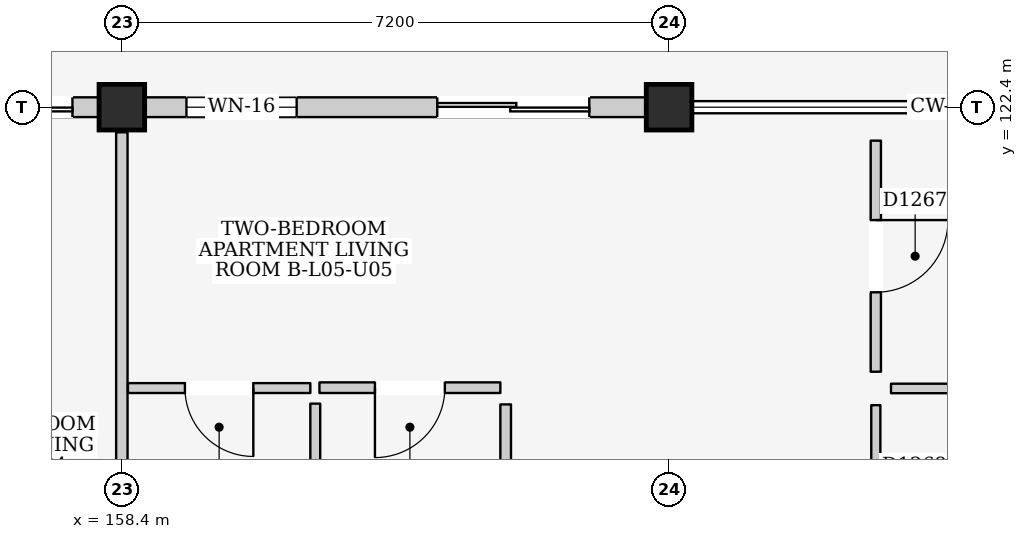
"""IFC4 building model, lengths in metres.
Left out: names, types, materials, properties, quantities, classifications, styles, units other than length and angle.
Written with IfcOpenShell. Run it as: python <this file> out.ifc"""

import sys

from ifc_helpers import new_model, si_unit, direction, frame, frame_2d, origin, origin_2d, place, context, subcontext, project, spatial, rectangle, extrude, element, fill, save


model = new_model("IFC4")
c1 = context("Model", 3, precision=1e-05, world=origin(), true_north=direction((0.0, 1.0)))
c2 = subcontext(c1, "Body", "Model", "MODEL_VIEW")
j1 = project(units=[si_unit("LENGTHUNIT", "METRE"), si_unit("PLANEANGLEUNIT", "RADIAN")], contexts=[c1])
p1 = place(None, origin())
s1 = spatial("IfcSite", under=j1, at=p1, CompositionType="ELEMENT")
p2 = place(p1, origin())
s2 = spatial("IfcBuilding", under=s1, at=p2, CompositionType="ELEMENT")
p3 = place(p2, frame((0.0, 0.0, 18.6)))
s3 = spatial("IfcBuildingStorey", under=s2, at=p3, CompositionType="ELEMENT", Elevation=18.6)
for number, where, z_axis, x_axis in (
    (1, (158.4, 122.4, 0.0), (0.0, 0.0, 1.0), (1.0, 0.0, 0.0)),
    (2, (165.6, 122.4, 0.0), (0.0, 0.0, 1.0), (1.0, 0.0, 0.0)),
):
    element("IfcColumn", number, at=place(p3, frame(where, z_axis=z_axis, x_axis=x_axis)), inside=s3, PredefinedType="COLUMN", context=c2, shape_type="SweptSolid", body=[
        extrude(rectangle(XDim=0.6, YDim=0.6, at=origin_2d()), origin(), (0.0, 0.0, 1.0), 3.3),
    ])
p4 = place(p3, frame((151.5, 122.4, 0.0), z_axis=(0.0, 0.0, 1.0), x_axis=(1.0, 0.0, 0.0)))
e3 = element("IfcWall", 3, at=p4, inside=s3, PredefinedType="ELEMENTEDWALL", context=c2, shape_type="SweptSolid", body=[
    extrude(rectangle(XDim=6.6, YDim=0.26, at=frame_2d((3.3, 0.0))), origin(), (0.0, 0.0, 1.0), 2.595),
])
p5 = place(p4, frame((3.85, 0.0, 0.0)))
e4 = element("IfcOpeningElement", 4, at=p5, cuts=e3, PredefinedType="OPENING", context=c2, shape_type="SweptSolid", body=[
    extrude(rectangle(XDim=2.4, YDim=2.12, at=frame_2d((1.2, 1.06))), frame((0.0, 0.145, 0.0), z_axis=(0.0, -1.0, 0.0), x_axis=(1.0, 0.0, 0.0)), (0.0, 0.0, 1.0), 0.29),
])
p6 = place(p4, frame((0.55, 0.0, 0.9)))
e5 = element("IfcOpeningElement", 5, at=p6, cuts=e3, PredefinedType="OPENING", context=c2, shape_type="SweptSolid", body=[
    extrude(rectangle(XDim=1.7, YDim=1.45, at=frame_2d((0.85, 0.725))), frame((0.0, 0.145, 0.0), z_axis=(0.0, -1.0, 0.0), x_axis=(1.0, 0.0, 0.0)), (0.0, 0.0, 1.0), 0.29),
])
p7 = place(p3, frame((158.7, 122.4, 0.0), z_axis=(0.0, 0.0, 1.0), x_axis=(1.0, 0.0, 0.0)))
e6 = element("IfcWall", 6, at=p7, inside=s3, PredefinedType="ELEMENTEDWALL", context=c2, shape_type="SweptSolid", body=[
    extrude(rectangle(XDim=6.6, YDim=0.26, at=frame_2d((3.3, 0.0))), origin(), (0.0, 0.0, 1.0), 2.595),
])
p8 = place(p7, frame((3.85, 0.0, 0.0)))
e7 = element("IfcOpeningElement", 7, at=p8, cuts=e6, PredefinedType="OPENING", context=c2, shape_type="SweptSolid", body=[
    extrude(rectangle(XDim=2.0, YDim=2.12, at=frame_2d((1.0, 1.06))), frame((0.0, 0.145, 0.0), z_axis=(0.0, -1.0, 0.0), x_axis=(1.0, 0.0, 0.0)), (0.0, 0.0, 1.0), 0.29),
])
p9 = place(p7, frame((0.55, 0.0, 0.9)))
e8 = element("IfcOpeningElement", 8, at=p9, cuts=e6, PredefinedType="OPENING", context=c2, shape_type="SweptSolid", body=[
    extrude(rectangle(XDim=1.45, YDim=1.4, at=frame_2d((0.725, 0.7))), frame((0.0, 0.145, 0.0), z_axis=(0.0, -1.0, 0.0), x_axis=(1.0, 0.0, 0.0)), (0.0, 0.0, 1.0), 0.29),
])
p10 = place(p3, frame((158.4, 115.53, 0.0), z_axis=(0.0, 0.0, 1.0), x_axis=(0.0, 1.0, 0.0)))
e9 = element("IfcWall", 9, at=p10, inside=s3, PredefinedType="PARTITIONING", context=c2, shape_type="SweptSolid", body=[
    extrude(rectangle(XDim=6.54, YDim=0.15, at=frame_2d((3.27, 0.0))), origin(), (0.0, 0.0, 1.0), 2.545),
])
p11 = place(p3, frame((158.48, 118.705, 0.0), z_axis=(0.0, 0.0, 1.0), x_axis=(1.0, 0.0, 0.0)))
e10 = element("IfcWall", 10, at=p11, inside=s3, PredefinedType="PARTITIONING", context=c2, shape_type="SweptSolid", body=[
    extrude(rectangle(XDim=2.4, YDim=0.13, at=frame_2d((1.2, 0.0))), origin(), (0.0, 0.0, 1.0), 3.06),
])
p12 = place(p11, frame((0.75, 0.0, 0.0)))
e11 = element("IfcOpeningElement", 11, at=p12, cuts=e10, PredefinedType="OPENING", context=c2, shape_type="SweptSolid", body=[
    extrude(rectangle(XDim=0.9, YDim=2.1, at=frame_2d((0.45, 1.05))), frame((0.0, 0.08, 0.0), z_axis=(0.0, -1.0, 0.0), x_axis=(1.0, 0.0, 0.0)), (0.0, 0.0, 1.0), 0.16),
])
p13 = place(p3, frame((160.945, 115.46, 0.0), z_axis=(0.0, 0.0, 1.0), x_axis=(0.0, 1.0, 0.0)))
e12 = element("IfcWall", 12, at=p13, inside=s3, PredefinedType="PARTITIONING", context=c2, shape_type="SweptSolid", body=[
    extrude(rectangle(XDim=3.04, YDim=0.13, at=frame_2d((1.52, 0.0))), origin(), (0.0, 0.0, 1.0), 3.06),
])
p14 = place(p3, frame((161.0, 118.71, 0.0), z_axis=(0.0, 0.0, 1.0), x_axis=(1.0, 0.0, 0.0)))
e13 = element("IfcWall", 13, at=p14, inside=s3, PredefinedType="PARTITIONING", context=c2, shape_type="SweptSolid", body=[
    extrude(rectangle(XDim=2.38, YDim=0.14, at=frame_2d((1.19, 0.0))), origin(), (0.0, 0.0, 1.0), 3.06),
])
p15 = place(p14, frame((0.73, 0.0, 0.0)))
e14 = element("IfcOpeningElement", 14, at=p15, cuts=e13, PredefinedType="OPENING", context=c2, shape_type="SweptSolid", body=[
    extrude(rectangle(XDim=0.92, YDim=2.1, at=frame_2d((0.46, 1.05))), frame((0.0, 0.085, 0.0), z_axis=(0.0, -1.0, 0.0), x_axis=(1.0, 0.0, 0.0)), (0.0, 0.0, 1.0), 0.17),
])
p16 = place(p3, frame((163.45, 115.43, 0.0), z_axis=(0.0, 0.0, 1.0), x_axis=(0.0, 1.0, 0.0)))
e15 = element("IfcWall", 15, at=p16, inside=s3, PredefinedType="PARTITIONING", context=c2, shape_type="SweptSolid", body=[
    extrude(rectangle(XDim=3.06, YDim=0.14, at=frame_2d((1.53, 0.0))), origin(), (0.0, 0.0, 1.0), 3.06),
])
p17 = place(p3, frame((168.32, 118.92, 0.0), z_axis=(0.0, 0.0, 1.0), x_axis=(0.0, 1.0, 0.0)))
e16 = element("IfcWall", 16, at=p17, inside=s3, PredefinedType="PARTITIONING", context=c2, shape_type="SweptSolid", body=[
    extrude(rectangle(XDim=3.04, YDim=0.135, at=frame_2d((1.52, 0.0))), origin(), (0.0, 0.0, 1.0), 3.06),
])
p18 = place(p17, frame((1.045, 0.0, 0.0)))
e17 = element("IfcOpeningElement", 17, at=p18, cuts=e16, PredefinedType="OPENING", context=c2, shape_type="SweptSolid", body=[
    extrude(rectangle(XDim=0.95, YDim=2.15, at=frame_2d((0.475, 1.075))), frame((0.0, 0.083, 0.0), z_axis=(0.0, -1.0, 0.0), x_axis=(1.0, 0.0, 0.0)), (0.0, 0.0, 1.0), 0.165),
])
p19 = place(p3, frame((168.52, 118.7, 0.0), z_axis=(0.0, 0.0, 1.0), x_axis=(1.0, 0.0, 0.0)))
e18 = element("IfcWall", 18, at=p19, inside=s3, PredefinedType="PARTITIONING", context=c2, shape_type="SweptSolid", body=[
    extrude(rectangle(XDim=4.06, YDim=0.125, at=frame_2d((2.03, 0.0))), origin(), (0.0, 0.0, 1.0), 3.06),
])
p20 = place(p3, frame((168.32, 115.44, 0.0), z_axis=(0.0, 0.0, 1.0), x_axis=(0.0, 1.0, 0.0)))
e19 = element("IfcWall", 19, at=p20, inside=s3, PredefinedType="PARTITIONING", context=c2, shape_type="SweptSolid", body=[
    extrude(rectangle(XDim=3.04, YDim=0.12, at=frame_2d((1.52, 0.0))), origin(), (0.0, 0.0, 1.0), 3.06),
])
p21 = place(p20, frame((1.04, 0.0, 0.0)))
e20 = element("IfcOpeningElement", 20, at=p21, cuts=e19, PredefinedType="OPENING", context=c2, shape_type="SweptSolid", body=[
    extrude(rectangle(XDim=0.96, YDim=2.15, at=frame_2d((0.48, 1.075))), frame((0.0, 0.075, 0.0), z_axis=(0.0, -1.0, 0.0), x_axis=(1.0, 0.0, 0.0)), (0.0, 0.0, 1.0), 0.15),
])
p22 = place(p5, frame((2.4, 0.0, 0.0), z_axis=(0.0, 0.0, 1.0), x_axis=(-1.0, 0.0, 0.0)))
e21 = element("IfcDoor", 21, at=p22, inside=s3, OperationType="DOUBLE_DOOR_SLIDING", PredefinedType="DOOR", context=c2, shape_type="SweptSolid", body=[
    extrude(rectangle(XDim=2.4, YDim=2.12, at=frame_2d((1.2, 1.06))), frame((0.0, 0.025, 0.0), z_axis=(0.0, -1.0, 0.0), x_axis=(1.0, 0.0, 0.0)), (0.0, 0.0, 1.0), 0.05),
])
fill(e4, e21)
p23 = place(p8, frame((2.0, 0.0, 0.0), z_axis=(0.0, 0.0, 1.0), x_axis=(-1.0, 0.0, 0.0)))
e22 = element("IfcDoor", 22, at=p23, inside=s3, OperationType="DOUBLE_DOOR_SLIDING", PredefinedType="DOOR", context=c2, shape_type="SweptSolid", body=[
    extrude(rectangle(XDim=2.0, YDim=2.12, at=frame_2d((1.0, 1.06))), frame((0.0, 0.025, 0.0), z_axis=(0.0, -1.0, 0.0), x_axis=(1.0, 0.0, 0.0)), (0.0, 0.0, 1.0), 0.05),
])
fill(e7, e22)
p24 = place(p9, origin())
e23 = element("IfcWindow", 23, at=p24, inside=s3, PartitioningType="DOUBLE_PANEL_VERTICAL", PredefinedType="WINDOW", context=c2, shape_type="SweptSolid", body=[
    extrude(rectangle(XDim=1.45, YDim=1.4, at=frame_2d((0.725, 0.7))), frame((0.0, 0.03, 0.0), z_axis=(0.0, -1.0, 0.0), x_axis=(1.0, 0.0, 0.0)), (0.0, 0.0, 1.0), 0.06),
])
fill(e8, e23)
p25 = place(p12, frame((0.9, 0.0, 0.0), z_axis=(0.0, 0.0, 1.0), x_axis=(-1.0, 0.0, 0.0)))
e24 = element("IfcDoor", 24, at=p25, inside=s3, OperationType="SINGLE_SWING_LEFT", PredefinedType="DOOR", context=c2, shape_type="SweptSolid", body=[
    extrude(rectangle(XDim=0.9, YDim=2.1, at=frame_2d((0.45, 1.05))), frame((0.0, 0.025, 0.0), z_axis=(0.0, -1.0, 0.0), x_axis=(1.0, 0.0, 0.0)), (0.0, 0.0, 1.0), 0.05),
])
fill(e11, e24)
p26 = place(p15, frame((0.92, 0.0, 0.0), z_axis=(0.0, 0.0, 1.0), x_axis=(-1.0, 0.0, 0.0)))
e25 = element("IfcDoor", 25, at=p26, inside=s3, OperationType="SINGLE_SWING_RIGHT", PredefinedType="DOOR", context=c2, shape_type="SweptSolid", body=[
    extrude(rectangle(XDim=0.92, YDim=2.1, at=frame_2d((0.46, 1.05))), frame((0.0, 0.025, 0.0), z_axis=(0.0, -1.0, 0.0), x_axis=(1.0, 0.0, 0.0)), (0.0, 0.0, 1.0), 0.05),
])
fill(e14, e25)
p27 = place(p18, frame((0.95, 0.0, 0.0), z_axis=(0.0, 0.0, 1.0), x_axis=(-1.0, 0.0, 0.0)))
e26 = element("IfcDoor", 26, at=p27, inside=s3, OperationType="SINGLE_SWING_LEFT", PredefinedType="DOOR", context=c2, shape_type="SweptSolid", body=[
    extrude(rectangle(XDim=0.95, YDim=2.15, at=frame_2d((0.475, 1.075))), frame((0.0, 0.025, 0.0), z_axis=(0.0, -1.0, 0.0), x_axis=(1.0, 0.0, 0.0)), (0.0, 0.0, 1.0), 0.05),
])
fill(e17, e26)
save(model, sys.argv[1])
